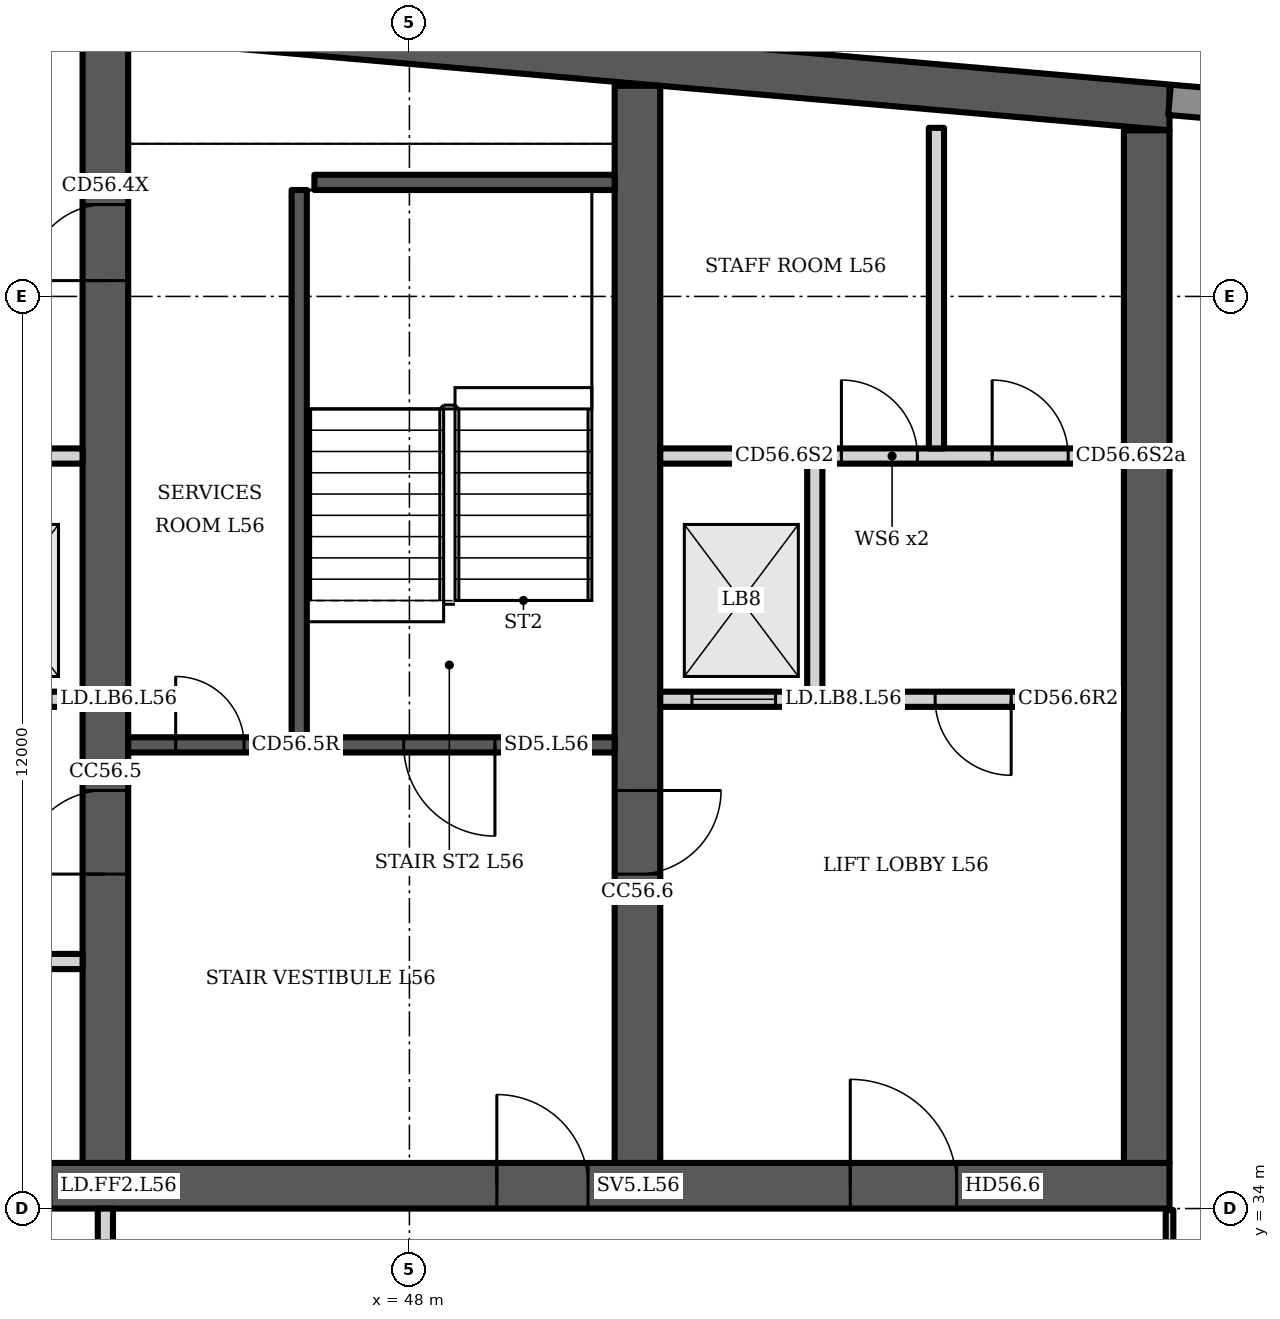
"""IFC4 building model, lengths in metres.
Left out: names, types, materials, properties, quantities, classifications, styles, units other than length and angle.
Written with IfcOpenShell. Run it as: python <this file> out.ifc"""

import sys

from ifc_helpers import new_model, si_unit, direction, frame, frame_2d, origin, place, context, subcontext, project, spatial, polyline, rectangle, outline, extrude, element, fill, save


model = new_model("IFC4")
c1 = context("Model", 3, precision=1e-05, world=origin(), true_north=direction((0.0, 1.0)))
c2 = subcontext(c1, "Body", "Model", "MODEL_VIEW")
j1 = project(units=[si_unit("LENGTHUNIT", "METRE"), si_unit("PLANEANGLEUNIT", "RADIAN")], contexts=[c1])
p1 = place(None, origin())
s1 = spatial("IfcSite", under=j1, at=p1, CompositionType="ELEMENT")
p2 = place(p1, origin())
s2 = spatial("IfcBuilding", under=s1, at=p2, CompositionType="ELEMENT")
p3 = place(p2, frame((0.0, 0.0, 225.1)))
s3 = spatial("IfcBuildingStorey", under=s2, at=p3, CompositionType="ELEMENT", Elevation=225.1)
p4 = place(p3, frame((0.0, 0.0, -0.0)))
e1 = element("IfcWall", 1, at=p4, inside=s3, PredefinedType="SHEAR", context=c2, shape_type="SweptSolid", body=[
    extrude(outline(polyline([(23.0, 48.185), (40.5, 49.716), (58.0, 48.185), (58.0, 48.787), (40.5, 50.318), (23.0, 48.787), (23.0, 48.185)])), origin(), (0.0, 0.0, 1.0), 3.6),
])
p5 = place(p3, frame((23.0, 34.3, 0.0), z_axis=(0.0, 0.0, 1.0), x_axis=(1.0, 0.0, 0.0)))
e2 = element("IfcWall", 2, at=p5, inside=s3, PredefinedType="SHEAR", context=c2, shape_type="SweptSolid", body=[
    extrude(rectangle(XDim=35.0, YDim=0.6, at=frame_2d((17.5, 0.0))), origin(), (0.0, 0.0, 1.0), 3.6),
])
p6 = place(p5, frame((0.65, 0.0, 0.0)))
e3 = element("IfcOpeningElement", 3, at=p6, cuts=e2, PredefinedType="OPENING", context=c2, shape_type="SweptSolid", body=[
    extrude(rectangle(XDim=1.2, YDim=2.1, at=frame_2d((0.6, 1.05))), frame((0.0, 0.31, 0.0), z_axis=(0.0, -1.0, 0.0), x_axis=(1.0, 0.0, 0.0)), (0.0, 0.0, 1.0), 0.62),
])
p7 = place(p5, frame((7.717, 0.0, 0.0)))
e4 = element("IfcOpeningElement", 4, at=p7, cuts=e2, PredefinedType="OPENING", context=c2, shape_type="SweptSolid", body=[
    extrude(rectangle(XDim=1.1, YDim=2.1, at=frame_2d((0.55, 1.05))), frame((0.0, 0.31, 0.0), z_axis=(0.0, -1.0, 0.0), x_axis=(1.0, 0.0, 0.0)), (0.0, 0.0, 1.0), 0.62),
])
p8 = place(p5, frame((12.183, 0.0, 0.0)))
e5 = element("IfcOpeningElement", 5, at=p8, cuts=e2, PredefinedType="OPENING", context=c2, shape_type="SweptSolid", body=[
    extrude(rectangle(XDim=1.1, YDim=2.1, at=frame_2d((0.55, 1.05))), frame((0.0, 0.31, 0.0), z_axis=(0.0, -1.0, 0.0), x_axis=(1.0, 0.0, 0.0)), (0.0, 0.0, 1.0), 0.62),
])
p9 = place(p5, frame((9.8, 0.0, 0.0)))
e6 = element("IfcOpeningElement", 6, at=p9, cuts=e2, PredefinedType="OPENING", context=c2, shape_type="SweptSolid", body=[
    extrude(rectangle(XDim=1.4, YDim=2.1, at=frame_2d((0.7, 1.05))), frame((0.0, 0.31, 0.0), z_axis=(0.0, -1.0, 0.0), x_axis=(1.0, 0.0, 0.0)), (0.0, 0.0, 1.0), 0.62),
])
p10 = place(p5, frame((14.717, 0.0, 0.0)))
e7 = element("IfcOpeningElement", 7, at=p10, cuts=e2, PredefinedType="OPENING", context=c2, shape_type="SweptSolid", body=[
    extrude(rectangle(XDim=1.1, YDim=2.1, at=frame_2d((0.55, 1.05))), frame((0.0, 0.31, 0.0), z_axis=(0.0, -1.0, 0.0), x_axis=(1.0, 0.0, 0.0)), (0.0, 0.0, 1.0), 0.62),
])
p11 = place(p5, frame((16.95, 0.0, 0.0)))
e8 = element("IfcOpeningElement", 8, at=p11, cuts=e2, PredefinedType="OPENING", context=c2, shape_type="SweptSolid", body=[
    extrude(rectangle(XDim=1.1, YDim=2.1, at=frame_2d((0.55, 1.05))), frame((0.0, 0.31, 0.0), z_axis=(0.0, -1.0, 0.0), x_axis=(1.0, 0.0, 0.0)), (0.0, 0.0, 1.0), 0.62),
])
p12 = place(p5, frame((19.183, 0.0, 0.0)))
e9 = element("IfcOpeningElement", 9, at=p12, cuts=e2, PredefinedType="OPENING", context=c2, shape_type="SweptSolid", body=[
    extrude(rectangle(XDim=1.1, YDim=2.1, at=frame_2d((0.55, 1.05))), frame((0.0, 0.31, 0.0), z_axis=(0.0, -1.0, 0.0), x_axis=(1.0, 0.0, 0.0)), (0.0, 0.0, 1.0), 0.62),
])
p13 = place(p5, frame((26.15, 0.0, 0.0)))
e10 = element("IfcOpeningElement", 10, at=p13, cuts=e2, PredefinedType="OPENING", context=c2, shape_type="SweptSolid", body=[
    extrude(rectangle(XDim=1.2, YDim=2.1, at=frame_2d((0.6, 1.05))), frame((0.0, 0.31, 0.0), z_axis=(0.0, -1.0, 0.0), x_axis=(1.0, 0.0, 0.0)), (0.0, 0.0, 1.0), 0.62),
])
p14 = place(p5, frame((30.8, 0.0, 0.0)))
e11 = element("IfcOpeningElement", 11, at=p14, cuts=e2, PredefinedType="OPENING", context=c2, shape_type="SweptSolid", body=[
    extrude(rectangle(XDim=1.4, YDim=2.1, at=frame_2d((0.7, 1.05))), frame((0.0, 0.31, 0.0), z_axis=(0.0, -1.0, 0.0), x_axis=(1.0, 0.0, 0.0)), (0.0, 0.0, 1.0), 0.62),
])
p15 = place(p3, frame((44.0, 34.6, 0.0), z_axis=(0.0, 0.0, 1.0), x_axis=(0.0, 1.0, 0.0)))
e12 = element("IfcWall", 12, at=p15, inside=s3, PredefinedType="SHEAR", context=c2, shape_type="SweptSolid", body=[
    extrude(rectangle(XDim=14.784, YDim=0.6, at=frame_2d((7.392, 0.0))), origin(), (0.0, 0.0, 1.0), 3.6),
])
p16 = place(p15, frame((11.608, 0.0, 0.0)))
e13 = element("IfcOpeningElement", 13, at=p16, cuts=e12, PredefinedType="OPENING", context=c2, shape_type="SweptSolid", body=[
    extrude(rectangle(XDim=1.0, YDim=2.1, at=frame_2d((0.5, 1.05))), frame((0.0, 0.31, 0.0), z_axis=(0.0, -1.0, 0.0), x_axis=(1.0, 0.0, 0.0)), (0.0, 0.0, 1.0), 0.62),
])
p17 = place(p15, frame((3.8, 0.0, 0.0)))
e14 = element("IfcOpeningElement", 14, at=p17, cuts=e12, PredefinedType="OPENING", context=c2, shape_type="SweptSolid", body=[
    extrude(rectangle(XDim=1.1, YDim=2.1, at=frame_2d((0.55, 1.05))), frame((0.0, 0.31, 0.0), z_axis=(0.0, -1.0, 0.0), x_axis=(1.0, 0.0, 0.0)), (0.0, 0.0, 1.0), 0.62),
])
p18 = place(p3, frame((51.0, 34.6, 0.0), z_axis=(0.0, 0.0, 1.0), x_axis=(0.0, 1.0, 0.0)))
e15 = element("IfcWall", 15, at=p18, inside=s3, PredefinedType="SHEAR", context=c2, shape_type="SweptSolid", body=[
    extrude(rectangle(XDim=14.171, YDim=0.6, at=frame_2d((7.085, 0.0))), origin(), (0.0, 0.0, 1.0), 3.6),
])
p19 = place(p18, frame((3.8, 0.0, 0.0)))
e16 = element("IfcOpeningElement", 16, at=p19, cuts=e15, PredefinedType="OPENING", context=c2, shape_type="SweptSolid", body=[
    extrude(rectangle(XDim=1.1, YDim=2.1, at=frame_2d((0.55, 1.05))), frame((0.0, 0.31, 0.0), z_axis=(0.0, -1.0, 0.0), x_axis=(1.0, 0.0, 0.0)), (0.0, 0.0, 1.0), 0.62),
])
p20 = place(p3, frame((57.7, 34.6, 0.0), z_axis=(0.0, 0.0, 1.0), x_axis=(0.0, 1.0, 0.0)))
e17 = element("IfcWall", 17, at=p20, inside=s3, PredefinedType="SHEAR", context=c2, shape_type="SweptSolid", body=[
    extrude(rectangle(XDim=13.585, YDim=0.6, at=frame_2d((6.792, 0.0))), origin(), (0.0, 0.0, 1.0), 3.6),
])
p21 = place(p3, frame((60.983, 48.326, 0.0), z_axis=(0.0, 0.0, 1.0), x_axis=(-0.996194, 0.087168, 0.0)))
e18 = element("IfcWall", 18, at=p21, inside=s3, PredefinedType="SOLIDWALL", context=c2, shape_type="SweptSolid", body=[
    extrude(rectangle(XDim=2.994, YDim=0.4, at=frame_2d((1.497, 0.0))), origin(), (0.0, 0.0, 1.0), 3.2),
])
p22 = place(p3, frame((37.3, 40.7, 0.0), z_axis=(0.0, 0.0, 1.0), x_axis=(1.0, 0.0, 0.0)))
e19 = element("IfcWall", 19, at=p22, inside=s3, PredefinedType="PARTITIONING", context=c2, shape_type="SweptSolid", body=[
    extrude(rectangle(XDim=6.4, YDim=0.2, at=frame_2d((3.2, 0.0))), origin(), (0.0, 0.0, 1.0), 3.2),
])
p23 = place(p22, frame((0.417, 0.0, 0.0)))
e20 = element("IfcOpeningElement", 20, at=p23, cuts=e19, PredefinedType="OPENING", context=c2, shape_type="SweptSolid", body=[
    extrude(rectangle(XDim=1.1, YDim=2.1, at=frame_2d((0.55, 1.05))), frame((0.0, 0.11, 0.0), z_axis=(0.0, -1.0, 0.0), x_axis=(1.0, 0.0, 0.0)), (0.0, 0.0, 1.0), 0.22),
])
p24 = place(p22, frame((2.65, 0.0, 0.0)))
e21 = element("IfcOpeningElement", 21, at=p24, cuts=e19, PredefinedType="OPENING", context=c2, shape_type="SweptSolid", body=[
    extrude(rectangle(XDim=1.1, YDim=2.1, at=frame_2d((0.55, 1.05))), frame((0.0, 0.11, 0.0), z_axis=(0.0, -1.0, 0.0), x_axis=(1.0, 0.0, 0.0)), (0.0, 0.0, 1.0), 0.22),
])
p25 = place(p22, frame((4.883, 0.0, 0.0)))
e22 = element("IfcOpeningElement", 22, at=p25, cuts=e19, PredefinedType="OPENING", context=c2, shape_type="SweptSolid", body=[
    extrude(rectangle(XDim=1.1, YDim=2.1, at=frame_2d((0.55, 1.05))), frame((0.0, 0.11, 0.0), z_axis=(0.0, -1.0, 0.0), x_axis=(1.0, 0.0, 0.0)), (0.0, 0.0, 1.0), 0.22),
])
p26 = place(p3, frame((0.0, 0.0, -0.0)))
e23 = element("IfcWall", 23, at=p26, inside=s3, PredefinedType="PARTITIONING", context=c2, shape_type="SweptSolid", body=[
    extrude(outline(polyline([(41.567, 37.1), (39.433, 37.1), (39.433, 34.6), (39.233, 34.6), (39.233, 37.45), (37.3, 37.45), (37.3, 37.65), (39.233, 37.65), (39.433, 37.65), (39.433, 37.3), (41.567, 37.3), (41.567, 37.35), (41.767, 37.35), (43.7, 37.35), (43.7, 37.15), (41.767, 37.15), (41.767, 34.6), (41.567, 34.6), (41.567, 37.1)])), origin(), (0.0, 0.0, 1.0), 3.2),
])
p27 = place(p3, frame((0.0, 0.0, -0.0)))
e24 = element("IfcWall", 24, at=p27, inside=s3, PredefinedType="PARTITIONING", context=c2, shape_type="SweptSolid", body=[
    extrude(outline(polyline([(39.433, 40.8), (39.233, 40.8), (39.233, 43.8), (37.3, 43.8), (37.3, 44.0), (43.7, 44.0), (43.7, 43.8), (41.767, 43.8), (41.767, 40.8), (41.567, 40.8), (41.567, 43.8), (39.433, 43.8), (39.433, 40.8)])), origin(), (0.0, 0.0, 1.0), 3.2),
])
p28 = place(p3, frame((44.3, 40.1, 0.0), z_axis=(0.0, 0.0, 1.0), x_axis=(1.0, 0.0, 0.0)))
e25 = element("IfcWall", 25, at=p28, inside=s3, PredefinedType="SHEAR", context=c2, shape_type="SweptSolid", body=[
    extrude(rectangle(XDim=6.4, YDim=0.2, at=frame_2d((3.2, 0.0))), origin(), (0.0, 0.0, 1.0), 3.2),
])
p29 = place(p28, frame((3.625, 0.0, 0.0)))
e26 = element("IfcOpeningElement", 26, at=p29, cuts=e25, PredefinedType="OPENING", context=c2, shape_type="SweptSolid", body=[
    extrude(rectangle(XDim=1.2, YDim=2.1, at=frame_2d((0.6, 1.05))), frame((0.0, 0.11, 0.0), z_axis=(0.0, -1.0, 0.0), x_axis=(1.0, 0.0, 0.0)), (0.0, 0.0, 1.0), 0.22),
])
p30 = place(p28, frame((0.625, 0.0, 0.0)))
e27 = element("IfcOpeningElement", 27, at=p30, cuts=e25, PredefinedType="OPENING", context=c2, shape_type="SweptSolid", body=[
    extrude(rectangle(XDim=0.9, YDim=2.1, at=frame_2d((0.45, 1.05))), frame((0.0, 0.11, 0.0), z_axis=(0.0, -1.0, 0.0), x_axis=(1.0, 0.0, 0.0)), (0.0, 0.0, 1.0), 0.22),
])
p31 = place(p3, frame((46.55, 40.2, 0.0), z_axis=(0.0, 0.0, 1.0), x_axis=(0.0, 1.0, 0.0)))
e28 = element("IfcWall", 28, at=p31, inside=s3, PredefinedType="SHEAR", context=c2, shape_type="SweptSolid", body=[
    extrude(rectangle(XDim=7.2, YDim=0.2, at=frame_2d((3.6, 0.0))), origin(), (0.0, 0.0, 1.0), 3.2),
])
p32 = place(p3, frame((46.75, 47.5, 0.0), z_axis=(0.0, 0.0, 1.0), x_axis=(1.0, 0.0, 0.0)))
e29 = element("IfcWall", 29, at=p32, inside=s3, PredefinedType="SHEAR", context=c2, shape_type="SweptSolid", body=[
    extrude(rectangle(XDim=3.95, YDim=0.2, at=frame_2d((1.975, 0.0))), origin(), (0.0, 0.0, 1.0), 3.2),
])
p33 = place(p3, frame((51.3, 40.7, 0.0), z_axis=(0.0, 0.0, 1.0), x_axis=(1.0, 0.0, 0.0)))
e30 = element("IfcWall", 30, at=p33, inside=s3, PredefinedType="PARTITIONING", context=c2, shape_type="SweptSolid", body=[
    extrude(rectangle(XDim=6.1, YDim=0.2, at=frame_2d((3.05, 0.0))), origin(), (0.0, 0.0, 1.0), 3.2),
])
p34 = place(p33, frame((0.417, 0.0, 0.0)))
e31 = element("IfcOpeningElement", 31, at=p34, cuts=e30, PredefinedType="OPENING", context=c2, shape_type="SweptSolid", body=[
    extrude(rectangle(XDim=1.1, YDim=2.1, at=frame_2d((0.55, 1.05))), frame((0.0, 0.11, 0.0), z_axis=(0.0, -1.0, 0.0), x_axis=(1.0, 0.0, 0.0)), (0.0, 0.0, 1.0), 0.22),
])
p35 = place(p33, frame((3.617, 0.0, 0.0)))
e32 = element("IfcOpeningElement", 32, at=p35, cuts=e30, PredefinedType="OPENING", context=c2, shape_type="SweptSolid", body=[
    extrude(rectangle(XDim=1.0, YDim=2.1, at=frame_2d((0.5, 1.05))), frame((0.0, 0.11, 0.0), z_axis=(0.0, -1.0, 0.0), x_axis=(1.0, 0.0, 0.0)), (0.0, 0.0, 1.0), 0.22),
])
p36 = place(p3, frame((51.3, 43.9, 0.0), z_axis=(0.0, 0.0, 1.0), x_axis=(1.0, 0.0, 0.0)))
e33 = element("IfcWall", 33, at=p36, inside=s3, PredefinedType="PARTITIONING", context=c2, shape_type="SweptSolid", body=[
    extrude(rectangle(XDim=6.1, YDim=0.2, at=frame_2d((3.05, 0.0))), origin(), (0.0, 0.0, 1.0), 3.2),
])
p37 = place(p36, frame((2.383, 0.0, 0.0)))
e34 = element("IfcOpeningElement", 34, at=p37, cuts=e33, PredefinedType="OPENING", context=c2, shape_type="SweptSolid", body=[
    extrude(rectangle(XDim=1.0, YDim=2.1, at=frame_2d((0.5, 1.05))), frame((0.0, 0.11, 0.0), z_axis=(0.0, -1.0, 0.0), x_axis=(1.0, 0.0, 0.0)), (0.0, 0.0, 1.0), 0.22),
])
p38 = place(p36, frame((4.367, 0.0, 0.0)))
e35 = element("IfcOpeningElement", 35, at=p38, cuts=e33, PredefinedType="OPENING", context=c2, shape_type="SweptSolid", body=[
    extrude(rectangle(XDim=1.0, YDim=2.1, at=frame_2d((0.5, 1.05))), frame((0.0, 0.11, 0.0), z_axis=(0.0, -1.0, 0.0), x_axis=(1.0, 0.0, 0.0)), (0.0, 0.0, 1.0), 0.22),
])
p39 = place(p3, frame((0.0, 0.0, -0.0)))
e36 = element("IfcWall", 36, at=p39, inside=s3, PredefinedType="PARTITIONING", context=c2, shape_type="SweptSolid", body=[
    extrude(outline(polyline([(53.433, 40.8), (53.433, 43.8), (53.233, 43.8), (53.233, 40.8), (53.433, 40.8)])), origin(), (0.0, 0.0, 1.0), 3.2),
])
p40 = place(p3, frame((54.933, 44.0, 0.0), z_axis=(0.0, 0.0, 1.0), x_axis=(0.0, 1.0, 0.0)))
e37 = element("IfcWall", 37, at=p40, inside=s3, PredefinedType="PARTITIONING", context=c2, shape_type="SweptSolid", body=[
    extrude(rectangle(XDim=4.218, YDim=0.2, at=frame_2d((2.109, 0.0))), origin(), (0.0, 0.0, 1.0), 3.2),
])
p41 = place(p3, frame((44.0, 30.5, 0.0), z_axis=(0.0, 0.0, 1.0), x_axis=(0.0, 1.0, 0.0)))
e38 = element("IfcWall", 38, at=p41, inside=s3, PredefinedType="PARTITIONING", context=c2, shape_type="SweptSolid", body=[
    extrude(rectangle(XDim=3.5, YDim=0.2, at=frame_2d((1.75, 0.0))), origin(), (0.0, 0.0, 1.0), 3.2),
])
p42 = place(p41, frame((1.2, 0.0, 0.0)))
e39 = element("IfcOpeningElement", 39, at=p42, cuts=e38, PredefinedType="OPENING", context=c2, shape_type="SweptSolid", body=[
    extrude(rectangle(XDim=1.1, YDim=2.1, at=frame_2d((0.55, 1.05))), frame((0.0, 0.11, 0.0), z_axis=(0.0, -1.0, 0.0), x_axis=(1.0, 0.0, 0.0)), (0.0, 0.0, 1.0), 0.22),
])
p43 = place(p3, frame((58.0, 31.5, 0.0), z_axis=(0.0, 0.0, 1.0), x_axis=(0.0, 1.0, 0.0)))
e40 = element("IfcWall", 40, at=p43, inside=s3, PredefinedType="PARTITIONING", context=c2, shape_type="SweptSolid", body=[
    extrude(rectangle(XDim=2.48, YDim=0.1, at=frame_2d((1.24, 0.0))), origin(), (0.0, 0.0, 1.0), 3.2),
])
p44 = place(p16, origin())
e41 = element("IfcDoor", 41, at=p44, inside=s3, OperationType="SINGLE_SWING_LEFT", PredefinedType="DOOR", context=c2, shape_type="SweptSolid", body=[
    extrude(rectangle(XDim=1.0, YDim=2.1, at=frame_2d((0.5, 1.05))), frame((0.0, 0.025, 0.0), z_axis=(0.0, -1.0, 0.0), x_axis=(1.0, 0.0, 0.0)), (0.0, 0.0, 1.0), 0.05),
])
fill(e13, e41)
p45 = place(p29, origin())
e42 = element("IfcDoor", 42, at=p45, inside=s3, OperationType="SINGLE_SWING_RIGHT", PredefinedType="DOOR", context=c2, shape_type="SweptSolid", body=[
    extrude(rectangle(XDim=1.2, YDim=2.1, at=frame_2d((0.6, 1.05))), frame((0.0, 0.025, 0.0), z_axis=(0.0, -1.0, 0.0), x_axis=(1.0, 0.0, 0.0)), (0.0, 0.0, 1.0), 0.05),
])
fill(e26, e42)
p46 = place(p30, origin())
e43 = element("IfcDoor", 43, at=p46, inside=s3, OperationType="SINGLE_SWING_LEFT", PredefinedType="DOOR", context=c2, shape_type="SweptSolid", body=[
    extrude(rectangle(XDim=0.9, YDim=2.1, at=frame_2d((0.45, 1.05))), frame((0.0, 0.025, 0.0), z_axis=(0.0, -1.0, 0.0), x_axis=(1.0, 0.0, 0.0)), (0.0, 0.0, 1.0), 0.05),
])
fill(e27, e43)
p47 = place(p13, origin())
e44 = element("IfcDoor", 44, at=p47, inside=s3, OperationType="SINGLE_SWING_LEFT", PredefinedType="DOOR", context=c2, shape_type="SweptSolid", body=[
    extrude(rectangle(XDim=1.2, YDim=2.1, at=frame_2d((0.6, 1.05))), frame((0.0, 0.025, 0.0), z_axis=(0.0, -1.0, 0.0), x_axis=(1.0, 0.0, 0.0)), (0.0, 0.0, 1.0), 0.05),
])
fill(e10, e44)
p48 = place(p14, origin())
e45 = element("IfcDoor", 45, at=p48, inside=s3, OperationType="DOUBLE_DOOR_SINGLE_SWING", PredefinedType="DOOR", context=c2, shape_type="SweptSolid", body=[
    extrude(rectangle(XDim=1.4, YDim=2.1, at=frame_2d((0.7, 1.05))), frame((0.0, 0.025, 0.0), z_axis=(0.0, -1.0, 0.0), x_axis=(1.0, 0.0, 0.0)), (0.0, 0.0, 1.0), 0.05),
])
fill(e11, e45)
p49 = place(p34, origin())
e46 = element("IfcDoor", 46, at=p49, inside=s3, OperationType="DOUBLE_DOOR_SLIDING", PredefinedType="DOOR", context=c2, shape_type="SweptSolid", body=[
    extrude(rectangle(XDim=1.1, YDim=2.1, at=frame_2d((0.55, 1.05))), frame((0.0, 0.025, 0.0), z_axis=(0.0, -1.0, 0.0), x_axis=(1.0, 0.0, 0.0)), (0.0, 0.0, 1.0), 0.05),
])
fill(e31, e46)
p50 = place(p35, origin())
e47 = element("IfcDoor", 47, at=p50, inside=s3, OperationType="SINGLE_SWING_RIGHT", PredefinedType="DOOR", context=c2, shape_type="SweptSolid", body=[
    extrude(rectangle(XDim=1.0, YDim=2.1, at=frame_2d((0.5, 1.05))), frame((0.0, 0.025, 0.0), z_axis=(0.0, -1.0, 0.0), x_axis=(1.0, 0.0, 0.0)), (0.0, 0.0, 1.0), 0.05),
])
fill(e32, e47)
p51 = place(p37, origin())
e48 = element("IfcDoor", 48, at=p51, inside=s3, OperationType="SINGLE_SWING_LEFT", PredefinedType="DOOR", context=c2, shape_type="SweptSolid", body=[
    extrude(rectangle(XDim=1.0, YDim=2.1, at=frame_2d((0.5, 1.05))), frame((0.0, 0.025, 0.0), z_axis=(0.0, -1.0, 0.0), x_axis=(1.0, 0.0, 0.0)), (0.0, 0.0, 1.0), 0.05),
])
fill(e34, e48)
p52 = place(p38, origin())
e49 = element("IfcDoor", 49, at=p52, inside=s3, OperationType="SINGLE_SWING_LEFT", PredefinedType="DOOR", context=c2, shape_type="SweptSolid", body=[
    extrude(rectangle(XDim=1.0, YDim=2.1, at=frame_2d((0.5, 1.05))), frame((0.0, 0.025, 0.0), z_axis=(0.0, -1.0, 0.0), x_axis=(1.0, 0.0, 0.0)), (0.0, 0.0, 1.0), 0.05),
])
fill(e35, e49)
p53 = place(p17, origin())
e50 = element("IfcDoor", 50, at=p53, inside=s3, OperationType="SINGLE_SWING_LEFT", PredefinedType="DOOR", context=c2, shape_type="SweptSolid", body=[
    extrude(rectangle(XDim=1.1, YDim=2.1, at=frame_2d((0.55, 1.05))), frame((0.0, 0.025, 0.0), z_axis=(0.0, -1.0, 0.0), x_axis=(1.0, 0.0, 0.0)), (0.0, 0.0, 1.0), 0.05),
])
fill(e14, e50)
p54 = place(p19, origin())
e51 = element("IfcDoor", 51, at=p54, inside=s3, OperationType="SINGLE_SWING_RIGHT", PredefinedType="DOOR", context=c2, shape_type="SweptSolid", body=[
    extrude(rectangle(XDim=1.1, YDim=2.1, at=frame_2d((0.55, 1.05))), frame((0.0, 0.025, 0.0), z_axis=(0.0, -1.0, 0.0), x_axis=(1.0, 0.0, 0.0)), (0.0, 0.0, 1.0), 0.05),
])
fill(e16, e51)
save(model, sys.argv[1])
